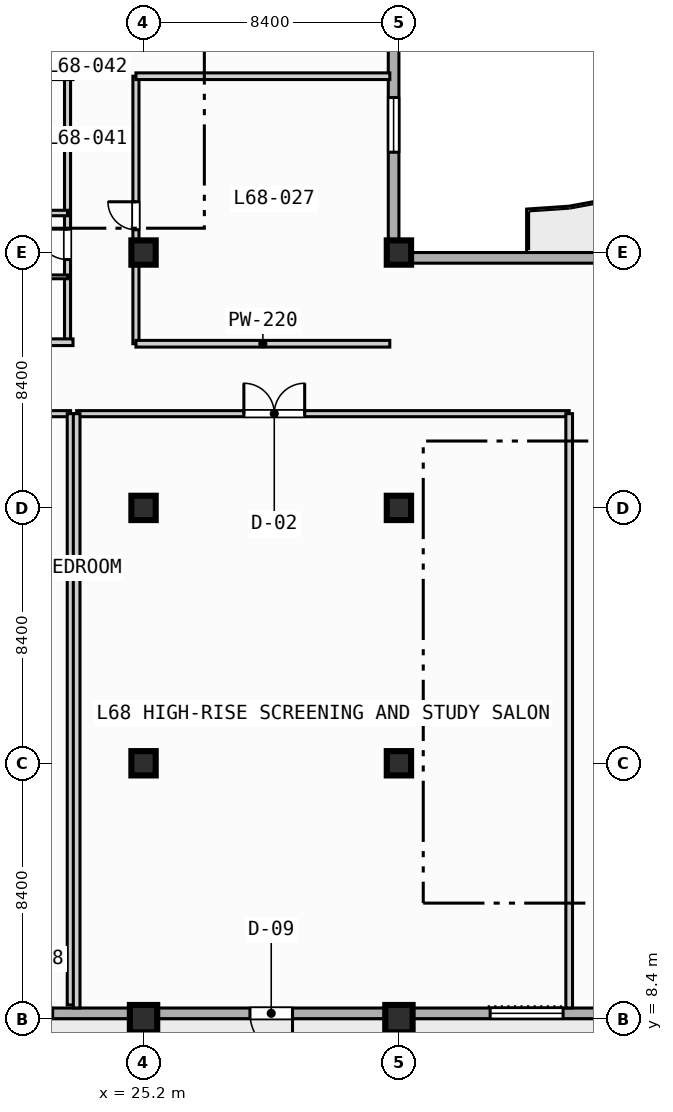
"""IFC4 building model, lengths in metres.
Left out: names, types, materials, properties, quantities, classifications, styles, units other than length and angle.
Written with IfcOpenShell. Run it as: python <this file> out.ifc"""

import sys

from ifc_helpers import new_model, si_unit, direction, frame, frame_2d, origin, origin_2d, place, context, subcontext, project, spatial, rectangle, extrude, element, fill, save


model = new_model("IFC4")
c1 = context("Model", 3, precision=1e-05, world=origin(), true_north=direction((0.0, 1.0)))
c2 = subcontext(c1, "Body", "Model", "MODEL_VIEW")
j1 = project(units=[si_unit("LENGTHUNIT", "METRE"), si_unit("PLANEANGLEUNIT", "RADIAN")], contexts=[c1])
p1 = place(None, origin())
s1 = spatial("IfcSite", under=j1, at=p1, CompositionType="ELEMENT")
p2 = place(p1, origin())
s2 = spatial("IfcBuilding", under=s1, at=p2, CompositionType="ELEMENT")
p3 = place(p2, frame((0.0, 0.0, 274.9)))
s3 = spatial("IfcBuildingStorey", under=s2, at=p3, CompositionType="ELEMENT", Elevation=274.9)
p4 = place(p3, frame((25.2, 8.4, 0.0), z_axis=(0.0, 0.0, 1.0), x_axis=(1.0, 0.0, 0.0)))
e1 = element("IfcColumn", 1, at=p4, inside=s3, PredefinedType="COLUMN", context=c2, shape_type="SweptSolid", body=[
    extrude(rectangle(XDim=0.9, YDim=0.9, at=origin_2d()), origin(), (0.0, 0.0, 1.0), 3.7),
])
for number, where, z_axis, x_axis in (
    (2, (25.2, 16.8, 0.0), (0.0, 0.0, 1.0), (1.0, 0.0, 0.0)),
    (3, (25.2, 25.2, 0.0), (0.0, 0.0, 1.0), (1.0, 0.0, 0.0)),
    (4, (25.2, 33.6, 0.0), (0.0, 0.0, 1.0), (1.0, 0.0, 0.0)),
):
    element("IfcColumn", number, at=place(p3, frame(where, z_axis=z_axis, x_axis=x_axis)), inside=s3, PredefinedType="COLUMN", context=c2, shape_type="SweptSolid", body=[
        extrude(rectangle(XDim=0.8, YDim=0.8, at=origin_2d()), origin(), (0.0, 0.0, 1.0), 3.7),
    ])
p5 = place(p3, frame((33.6, 8.4, 0.0), z_axis=(0.0, 0.0, 1.0), x_axis=(1.0, 0.0, 0.0)))
e5 = element("IfcColumn", 5, at=p5, inside=s3, PredefinedType="COLUMN", context=c2, shape_type="SweptSolid", body=[
    extrude(rectangle(XDim=0.9, YDim=0.9, at=origin_2d()), origin(), (0.0, 0.0, 1.0), 3.7),
])
for number, where, z_axis, x_axis in (
    (6, (33.6, 16.8, 0.0), (0.0, 0.0, 1.0), (1.0, 0.0, 0.0)),
    (7, (33.6, 25.2, 0.0), (0.0, 0.0, 1.0), (1.0, 0.0, 0.0)),
    (8, (33.6, 33.6, 0.0), (0.0, 0.0, 1.0), (1.0, 0.0, 0.0)),
):
    element("IfcColumn", number, at=place(p3, frame(where, z_axis=z_axis, x_axis=x_axis)), inside=s3, PredefinedType="COLUMN", context=c2, shape_type="SweptSolid", body=[
        extrude(rectangle(XDim=0.8, YDim=0.8, at=origin_2d()), origin(), (0.0, 0.0, 1.0), 3.7),
    ])
p6 = place(p3, frame((33.425, 72.425, 0.0), z_axis=(0.0, 0.0, 1.0), x_axis=(0.0, -1.0, 0.0)))
e9 = element("IfcWall", 9, at=p6, inside=s3, PredefinedType="STANDARD", context=c2, shape_type="SweptSolid", body=[
    extrude(rectangle(XDim=39.0, YDim=0.35, at=frame_2d((19.5, 0.0))), origin(), (0.0, 0.0, 1.0), 3.47),
])
p7 = place(p6, frame((33.725, 0.0, 0.85)))
e10 = element("IfcOpeningElement", 10, at=p7, cuts=e9, PredefinedType="OPENING", context=c2, shape_type="SweptSolid", body=[
    extrude(rectangle(XDim=1.8, YDim=1.8, at=frame_2d((0.9, 0.9))), frame((0.0, 0.185, 0.0), z_axis=(0.0, -1.0, 0.0), x_axis=(1.0, 0.0, 0.0)), (0.0, 0.0, 1.0), 0.37),
])
p8 = place(p6, frame((8.225, 0.0, 0.85)))
e11 = element("IfcOpeningElement", 11, at=p8, cuts=e9, PredefinedType="OPENING", context=c2, shape_type="SweptSolid", body=[
    extrude(rectangle(XDim=2.4, YDim=1.95, at=frame_2d((1.2, 0.975))), frame((0.0, 0.185, 0.0), z_axis=(0.0, -1.0, 0.0), x_axis=(1.0, 0.0, 0.0)), (0.0, 0.0, 1.0), 0.37),
])
p9 = place(p3, frame((33.425, 33.425, 0.0), z_axis=(0.0, 0.0, 1.0), x_axis=(1.0, 0.0, 0.0)))
e12 = element("IfcWall", 12, at=p9, inside=s3, PredefinedType="STANDARD", context=c2, shape_type="SweptSolid", body=[
    extrude(rectangle(XDim=39.0, YDim=0.35, at=frame_2d((19.5, 0.0))), origin(), (0.0, 0.0, 1.0), 3.47),
])
p10 = place(p9, frame((12.075, 0.0, 0.0)))
e13 = element("IfcOpeningElement", 13, at=p10, cuts=e12, PredefinedType="OPENING", context=c2, shape_type="SweptSolid", body=[
    extrude(rectangle(XDim=1.4, YDim=2.2, at=frame_2d((0.7, 1.1))), frame((0.0, 0.185, 0.0), z_axis=(0.0, -1.0, 0.0), x_axis=(1.0, 0.0, 0.0)), (0.0, 0.0, 1.0), 0.37),
])
p11 = place(p3, frame((72.425, 8.575, 0.0), z_axis=(0.0, 0.0, 1.0), x_axis=(-1.0, 0.0, 0.0)))
e14 = element("IfcWall", 14, at=p11, inside=s3, PredefinedType="STANDARD", context=c2, shape_type="SweptSolid", body=[
    extrude(rectangle(XDim=60.85, YDim=0.35, at=frame_2d((30.425, 0.0))), origin(), (0.0, 0.0, 1.0), 3.47),
])
p12 = place(p11, frame((42.325, 0.0, 0.0)))
e15 = element("IfcOpeningElement", 15, at=p12, cuts=e14, PredefinedType="OPENING", context=c2, shape_type="SweptSolid", body=[
    extrude(rectangle(XDim=1.4, YDim=2.2, at=frame_2d((0.7, 1.1))), frame((0.0, 0.185, 0.0), z_axis=(0.0, -1.0, 0.0), x_axis=(1.0, 0.0, 0.0)), (0.0, 0.0, 1.0), 0.37),
])
p13 = place(p11, frame((33.425, 0.0, 0.85)))
e16 = element("IfcOpeningElement", 16, at=p13, cuts=e14, PredefinedType="OPENING", context=c2, shape_type="SweptSolid", body=[
    extrude(rectangle(XDim=2.4, YDim=1.95, at=frame_2d((1.2, 0.975))), frame((0.0, 0.185, 0.0), z_axis=(0.0, -1.0, 0.0), x_axis=(1.0, 0.0, 0.0)), (0.0, 0.0, 1.0), 0.37),
])
p14 = place(p11, frame((25.325, 0.0, 0.85)))
e17 = element("IfcOpeningElement", 17, at=p14, cuts=e14, PredefinedType="OPENING", context=c2, shape_type="SweptSolid", body=[
    extrude(rectangle(XDim=1.8, YDim=1.8, at=frame_2d((0.9, 0.9))), frame((0.0, 0.185, 0.0), z_axis=(0.0, -1.0, 0.0), x_axis=(1.0, 0.0, 0.0)), (0.0, 0.0, 1.0), 0.37),
])
p15 = place(p11, frame((50.215, 0.0, 0.85)))
e18 = element("IfcOpeningElement", 18, at=p15, cuts=e14, PredefinedType="OPENING", context=c2, shape_type="SweptSolid", body=[
    extrude(rectangle(XDim=1.8, YDim=1.8, at=frame_2d((0.9, 0.9))), frame((0.0, 0.185, 0.0), z_axis=(0.0, -1.0, 0.0), x_axis=(1.0, 0.0, 0.0)), (0.0, 0.0, 1.0), 0.37),
])
p16 = place(p11, frame((57.935, 0.0, 0.85)))
e19 = element("IfcOpeningElement", 19, at=p16, cuts=e14, PredefinedType="OPENING", context=c2, shape_type="SweptSolid", body=[
    extrude(rectangle(XDim=1.8, YDim=1.8, at=frame_2d((0.9, 0.9))), frame((0.0, 0.185, 0.0), z_axis=(0.0, -1.0, 0.0), x_axis=(1.0, 0.0, 0.0)), (0.0, 0.0, 1.0), 0.37),
])
p17 = place(p3, frame((24.95, 30.6, 0.0), z_axis=(0.0, 0.0, 1.0), x_axis=(0.0, 1.0, 0.0)))
e20 = element("IfcWall", 20, at=p17, inside=s3, PredefinedType="PARTITIONING", context=c2, shape_type="SweptSolid", body=[
    extrude(rectangle(XDim=8.8, YDim=0.2, at=frame_2d((4.4, 0.0))), origin(), (0.0, 0.0, 1.0), 2.82),
])
p18 = place(p17, frame((3.75, 0.0, 0.0)))
e21 = element("IfcOpeningElement", 21, at=p18, cuts=e20, PredefinedType="OPENING", context=c2, shape_type="SweptSolid", body=[
    extrude(rectangle(XDim=0.92, YDim=2.1, at=frame_2d((0.46, 1.05))), frame((0.0, 0.11, 0.0), z_axis=(0.0, -1.0, 0.0), x_axis=(1.0, 0.0, 0.0)), (0.0, 0.0, 1.0), 0.22),
])
for number, where, z_axis, x_axis in (
    (22, (24.95, 30.6, 0.0), (0.0, 0.0, 1.0), (1.0, 0.0, 0.0)),
    (23, (24.95, 39.4, 0.0), (0.0, 0.0, 1.0), (1.0, 0.0, 0.0)),
):
    element("IfcWall", number, at=place(p3, frame(where, z_axis=z_axis, x_axis=x_axis)), inside=s3, PredefinedType="PARTITIONING", context=c2, shape_type="SweptSolid", body=[
        extrude(rectangle(XDim=8.35, YDim=0.22, at=frame_2d((4.175, 0.0))), origin(), (0.0, 0.0, 1.0), 3.47),
    ])
p19 = place(p3, frame((11.8, 28.3, 0.0), z_axis=(0.0, 0.0, 1.0), x_axis=(1.0, 0.0, 0.0)))
e24 = element("IfcWall", 24, at=p19, inside=s3, PredefinedType="PARTITIONING", context=c2, shape_type="SweptSolid", body=[
    extrude(rectangle(XDim=11.0, YDim=0.2, at=frame_2d((5.5, 0.0))), origin(), (0.0, 0.0, 1.0), 3.47),
])
p20 = place(p19, frame((4.05, 0.0, 0.0)))
e25 = element("IfcOpeningElement", 25, at=p20, cuts=e24, PredefinedType="OPENING", context=c2, shape_type="SweptSolid", body=[
    extrude(rectangle(XDim=1.0, YDim=2.15, at=frame_2d((0.5, 1.075))), frame((0.0, 0.11, 0.0), z_axis=(0.0, -1.0, 0.0), x_axis=(1.0, 0.0, 0.0)), (0.0, 0.0, 1.0), 0.22),
])
p21 = place(p3, frame((22.8, 8.85, 0.0), z_axis=(0.0, 0.0, 1.0), x_axis=(0.0, 1.0, 0.0)))
e26 = element("IfcWall", 26, at=p21, inside=s3, PredefinedType="PARTITIONING", context=c2, shape_type="SweptSolid", body=[
    extrude(rectangle(XDim=19.45, YDim=0.22, at=frame_2d((9.725, 0.0))), origin(), (0.0, 0.0, 1.0), 3.47),
])
p22 = place(p3, frame((23.0, 28.3, 0.0), z_axis=(0.0, 0.0, 1.0), x_axis=(1.0, 0.0, 0.0)))
e27 = element("IfcWall", 27, at=p22, inside=s3, PredefinedType="PARTITIONING", context=c2, shape_type="SweptSolid", body=[
    extrude(rectangle(XDim=16.2, YDim=0.2, at=frame_2d((8.1, 0.0))), origin(), (0.0, 0.0, 1.0), 3.47),
])
p23 = place(p22, frame((5.5, 0.0, 0.0)))
e28 = element("IfcOpeningElement", 28, at=p23, cuts=e27, PredefinedType="OPENING", context=c2, shape_type="SweptSolid", body=[
    extrude(rectangle(XDim=2.0, YDim=2.15, at=frame_2d((1.0, 1.075))), frame((0.0, 0.11, 0.0), z_axis=(0.0, -1.0, 0.0), x_axis=(1.0, 0.0, 0.0)), (0.0, 0.0, 1.0), 0.22),
])
for number, where, z_axis, x_axis in (
    (29, (23.0, 8.75, 0.0), (0.0, 0.0, 1.0), (0.0, 1.0, 0.0)),
    (30, (39.2, 8.75, 0.0), (0.0, 0.0, 1.0), (0.0, 1.0, 0.0)),
):
    element("IfcWall", number, at=place(p3, frame(where, z_axis=z_axis, x_axis=x_axis)), inside=s3, PredefinedType="PARTITIONING", context=c2, shape_type="SweptSolid", body=[
        extrude(rectangle(XDim=19.55, YDim=0.22, at=frame_2d((9.775, 0.0))), origin(), (0.0, 0.0, 1.0), 3.47),
    ])
p24 = place(p3, frame((22.7, 30.65, 0.0), z_axis=(0.0, 0.0, 1.0), x_axis=(0.0, 1.0, 0.0)))
e31 = element("IfcWall", 31, at=p24, inside=s3, PredefinedType="PARTITIONING", context=c2, shape_type="SweptSolid", body=[
    extrude(rectangle(XDim=8.75, YDim=0.2, at=frame_2d((4.375, 0.0))), origin(), (0.0, 0.0, 1.0), 3.47),
])
p25 = place(p24, frame((2.72, 0.0, 0.0)))
e32 = element("IfcOpeningElement", 32, at=p25, cuts=e31, PredefinedType="OPENING", context=c2, shape_type="SweptSolid", body=[
    extrude(rectangle(XDim=1.0, YDim=2.15, at=frame_2d((0.5, 1.075))), frame((0.0, 0.11, 0.0), z_axis=(0.0, -1.0, 0.0), x_axis=(1.0, 0.0, 0.0)), (0.0, 0.0, 1.0), 0.22),
])
for number, where, z_axis, x_axis in (
    (33, (8.6, 30.65, 0.0), (0.0, 0.0, 1.0), (1.0, 0.0, 0.0)),
    (34, (8.6, 39.4, 0.0), (0.0, 0.0, 1.0), (1.0, 0.0, 0.0)),
):
    element("IfcWall", number, at=place(p3, frame(where, z_axis=z_axis, x_axis=x_axis)), inside=s3, PredefinedType="PARTITIONING", context=c2, shape_type="SweptSolid", body=[
        extrude(rectangle(XDim=14.28, YDim=0.22, at=frame_2d((7.14, 0.0))), origin(), (0.0, 0.0, 1.0), 3.47),
    ])
for number, where, z_axis, x_axis in (
    (35, (20.25, 34.9, 0.0), (0.0, 0.0, 1.0), (1.0, 0.0, 0.0)),
    (36, (20.25, 37.06, 0.0), (0.0, 0.0, 1.0), (1.0, 0.0, 0.0)),
):
    element("IfcWall", number, at=place(p3, frame(where, z_axis=z_axis, x_axis=x_axis)), inside=s3, PredefinedType="PLUMBINGWALL", context=c2, shape_type="SweptSolid", body=[
        extrude(rectangle(XDim=2.45, YDim=0.18, at=frame_2d((1.225, 0.0))), origin(), (0.0, 0.0, 1.0), 3.47),
    ])
p26 = place(p3, frame((8.75, 32.8, 0.0), z_axis=(0.0, 0.0, 1.0), x_axis=(1.0, 0.0, 0.0)))
e37 = element("IfcWall", 37, at=p26, inside=s3, PredefinedType="PARTITIONING", context=c2, shape_type="SweptSolid", body=[
    extrude(rectangle(XDim=13.95, YDim=0.125, at=frame_2d((6.975, 0.0))), origin(), (0.0, 0.0, 1.0), 3.47),
])
p27 = place(p26, frame((5.29, 0.0, 0.0)))
e38 = element("IfcOpeningElement", 38, at=p27, cuts=e37, PredefinedType="OPENING", context=c2, shape_type="SweptSolid", body=[
    extrude(rectangle(XDim=0.92, YDim=2.1, at=frame_2d((0.46, 1.05))), frame((0.0, 0.073, 0.0), z_axis=(0.0, -1.0, 0.0), x_axis=(1.0, 0.0, 0.0)), (0.0, 0.0, 1.0), 0.145),
])
p28 = place(p7, origin())
e39 = element("IfcWindow", 39, at=p28, inside=s3, PartitioningType="SINGLE_PANEL", PredefinedType="WINDOW", context=c2, shape_type="SweptSolid", body=[
    extrude(rectangle(XDim=1.8, YDim=1.8, at=frame_2d((0.9, 0.9))), frame((0.0, 0.03, 0.0), z_axis=(0.0, -1.0, 0.0), x_axis=(1.0, 0.0, 0.0)), (0.0, 0.0, 1.0), 0.06),
])
fill(e10, e39)
p29 = place(p12, origin())
e40 = element("IfcDoor", 40, at=p29, inside=s3, OperationType="SINGLE_SWING_LEFT", PredefinedType="DOOR", context=c2, shape_type="SweptSolid", body=[
    extrude(rectangle(XDim=1.4, YDim=2.2, at=frame_2d((0.7, 1.1))), frame((0.0, 0.025, 0.0), z_axis=(0.0, -1.0, 0.0), x_axis=(1.0, 0.0, 0.0)), (0.0, 0.0, 1.0), 0.05),
])
fill(e15, e40)
p30 = place(p13, origin())
e41 = element("IfcWindow", 41, at=p30, inside=s3, PartitioningType="SINGLE_PANEL", PredefinedType="WINDOW", context=c2, shape_type="SweptSolid", body=[
    extrude(rectangle(XDim=2.4, YDim=1.95, at=frame_2d((1.2, 0.975))), frame((0.0, 0.03, 0.0), z_axis=(0.0, -1.0, 0.0), x_axis=(1.0, 0.0, 0.0)), (0.0, 0.0, 1.0), 0.06),
])
fill(e16, e41)
p31 = place(p15, origin())
e42 = element("IfcWindow", 42, at=p31, inside=s3, PartitioningType="SINGLE_PANEL", PredefinedType="WINDOW", context=c2, shape_type="SweptSolid", body=[
    extrude(rectangle(XDim=1.8, YDim=1.8, at=frame_2d((0.9, 0.9))), frame((0.0, 0.03, 0.0), z_axis=(0.0, -1.0, 0.0), x_axis=(1.0, 0.0, 0.0)), (0.0, 0.0, 1.0), 0.06),
])
fill(e18, e42)
p32 = place(p18, origin())
e43 = element("IfcDoor", 43, at=p32, inside=s3, OperationType="SINGLE_SWING_RIGHT", PredefinedType="DOOR", context=c2, shape_type="SweptSolid", body=[
    extrude(rectangle(XDim=0.92, YDim=2.1, at=frame_2d((0.46, 1.05))), frame((0.0, 0.025, 0.0), z_axis=(0.0, -1.0, 0.0), x_axis=(1.0, 0.0, 0.0)), (0.0, 0.0, 1.0), 0.05),
])
fill(e21, e43)
p33 = place(p23, origin())
e44 = element("IfcDoor", 44, at=p33, inside=s3, OperationType="SINGLE_SWING_LEFT", PredefinedType="DOOR", context=c2, shape_type="SweptSolid", body=[
    extrude(rectangle(XDim=2.0, YDim=2.15, at=frame_2d((1.0, 1.075))), frame((0.0, 0.025, 0.0), z_axis=(0.0, -1.0, 0.0), x_axis=(1.0, 0.0, 0.0)), (0.0, 0.0, 1.0), 0.05),
])
fill(e28, e44)
p34 = place(p25, origin())
e45 = element("IfcDoor", 45, at=p34, inside=s3, OperationType="SINGLE_SWING_RIGHT", PredefinedType="DOOR", context=c2, shape_type="SweptSolid", body=[
    extrude(rectangle(XDim=1.0, YDim=2.15, at=frame_2d((0.5, 1.075))), frame((0.0, 0.025, 0.0), z_axis=(0.0, -1.0, 0.0), x_axis=(1.0, 0.0, 0.0)), (0.0, 0.0, 1.0), 0.05),
])
fill(e32, e45)
save(model, sys.argv[1])
